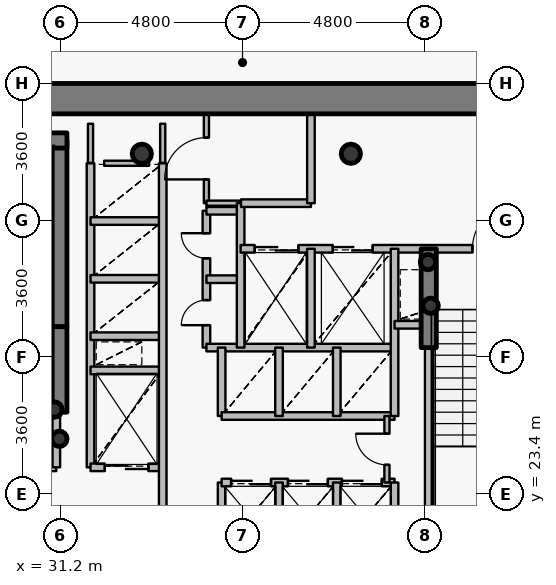
"""IFC4 building model, lengths in metres.
Left out: names, types, materials, properties, quantities, classifications, styles, units other than length and angle.
Written with IfcOpenShell. Run it as: python <this file> out.ifc"""

import sys

from ifc_helpers import new_model, si_unit, direction, frame, frame_2d, origin, origin_2d, place, context, subcontext, project, spatial, rectangle, hollow_circle, extrude, source, transform, mapped, element, fill, save


model = new_model("IFC4")
c1 = context("Model", 3, precision=1e-05, world=origin(), true_north=direction((0.0, 1.0)))
c2 = subcontext(c1, "Body", "Model", "MODEL_VIEW")
j1 = project(units=[si_unit("LENGTHUNIT", "METRE"), si_unit("PLANEANGLEUNIT", "RADIAN")], contexts=[c1])
p1 = place(None, origin())
s1 = spatial("IfcSite", under=j1, at=p1, CompositionType="ELEMENT")
p2 = place(p1, origin())
s2 = spatial("IfcBuilding", under=s1, at=p2, CompositionType="ELEMENT")
p3 = place(p2, frame((0.0, 0.0, 127.2)))
s3 = spatial("IfcBuildingStorey", under=s2, at=p3, CompositionType="ELEMENT", Elevation=127.2)
for number, where, z_axis, x_axis in (
    (1, (38.85, 32.35, 0.0), (0.0, 0.0, 1.0), (1.0, 0.0, 0.0)),
    (2, (33.35, 32.35, 0.0), (0.0, 0.0, 1.0), (1.0, 0.0, 0.0)),
):
    element("IfcColumn", number, at=place(p3, frame(where, z_axis=z_axis, x_axis=x_axis)), inside=s3, PredefinedType="COLUMN", context=c2, shape_type="SweptSolid", body=[
        extrude(hollow_circle(Radius=0.254, WallThickness=0.02, at=origin_2d()), origin(), (0.0, 0.0, 1.0), 3.75),
    ])
p4 = place(p3, frame((31.18, 27.8, 0.0), z_axis=(0.0, 0.0, 1.0), x_axis=(0.0, 1.0, 0.0)))
e3 = element("IfcWall", 3, at=p4, inside=s3, PredefinedType="SHEAR", context=c2, shape_type="SweptSolid", body=[
    extrude(rectangle(XDim=4.9, YDim=0.4, at=frame_2d((2.45, 0.0))), origin(), (0.0, 0.0, 1.0), 3.75),
])
p5 = place(p3, frame((27.28, 32.7, 0.0), z_axis=(0.0, 0.0, 1.0), x_axis=(1.0, 0.0, 0.0)))
e4 = element("IfcWall", 4, at=p5, inside=s3, PredefinedType="SHEAR", context=c2, shape_type="SweptSolid", body=[
    extrude(rectangle(XDim=4.1, YDim=0.4, at=frame_2d((2.05, 0.0))), origin(), (0.0, 0.0, 1.0), 3.75),
])
for number, where, z_axis, x_axis in (
    (5, (31.05, 25.62, 0.0), (0.0, 0.0, 1.0), (1.0, 0.0, 0.0)),
    (6, (31.18, 24.85, 0.0), (0.0, 0.0, 1.0), (1.0, 0.0, 0.0)),
    (7, (40.95, 28.35, 0.0), (0.0, 0.0, 1.0), (1.0, 0.0, 0.0)),
    (8, (40.88, 29.5, 0.0), (0.0, 0.0, 1.0), (1.0, 0.0, 0.0)),
):
    element("IfcColumn", number, at=place(p3, frame(where, z_axis=z_axis, x_axis=x_axis)), inside=s3, PredefinedType="COLUMN", context=c2, shape_type="SweptSolid", body=[
        extrude(hollow_circle(Radius=0.203, WallThickness=0.016, at=origin_2d()), origin(), (0.0, 0.0, 1.0), 3.75),
    ])
p6 = place(p3, frame((26.6, 33.8, 0.0), z_axis=(0.0, 0.0, 1.0), x_axis=(1.0, 0.0, 0.0)))
e9 = element("IfcWall", 9, at=p6, inside=s3, PredefinedType="SHEAR", context=c2, shape_type="SweptSolid", body=[
    extrude(rectangle(XDim=18.8, YDim=0.8, at=frame_2d((9.4, 0.0))), origin(), (0.0, 0.0, 1.0), 2.95),
])
p7 = place(p3, frame((31.18, 25.55, 0.0), z_axis=(0.0, 0.0, 1.0), x_axis=(0.0, 1.0, 0.0)))
e10 = element("IfcWall", 10, at=p7, inside=s3, PredefinedType="SHEAR", context=c2, shape_type="SweptSolid", body=[
    extrude(rectangle(XDim=2.25, YDim=0.4, at=frame_2d((1.125, 0.0))), origin(), (0.0, 0.0, 1.0), 3.1),
])
p8 = place(p3, frame((40.9, 27.25, 0.0), z_axis=(0.0, 0.0, 1.0), x_axis=(0.0, 1.0, 0.0)))
e11 = element("IfcWall", 11, at=p8, inside=s3, PredefinedType="SHEAR", context=c2, shape_type="SweptSolid", body=[
    extrude(rectangle(XDim=2.6, YDim=0.4, at=frame_2d((1.3, 0.0))), origin(), (0.0, 0.0, 1.0), 3.1),
])
p9 = place(p3, frame((27.56, 24.1, 0.0), z_axis=(0.0, 0.0, 1.0), x_axis=(1.0, 0.0, 0.0)))
e12 = element("IfcWall", 12, at=p9, inside=s3, PredefinedType="PARTITIONING", context=c2, shape_type="SweptSolid", body=[
    extrude(rectangle(XDim=3.54, YDim=0.2, at=frame_2d((1.77, 0.0))), origin(), (0.0, 0.0, 1.0), 3.5),
])
p10 = place(p9, frame((1.17, 0.0, 0.0)))
e13 = element("IfcOpeningElement", 13, at=p10, cuts=e12, PredefinedType="OPENING", context=c2, shape_type="SweptSolid", body=[
    extrude(rectangle(XDim=1.2, YDim=2.15, at=origin_2d()), frame((0.6, 0.11, 1.075), z_axis=(0.0, -1.0, 0.0), x_axis=(1.0, 0.0, 0.0)), (0.0, 0.0, 1.0), 0.22),
])
p11 = place(p3, frame((31.1, 24.1, 0.0), z_axis=(0.0, 0.0, 1.0), x_axis=(0.0, 1.0, 0.0)))
e14 = element("IfcWall", 14, at=p11, inside=s3, PredefinedType="PARTITIONING", context=c2, shape_type="SweptSolid", body=[
    extrude(rectangle(XDim=1.44, YDim=0.2, at=frame_2d((0.72, 0.0))), origin(), (0.0, 0.0, 1.0), 3.5),
])
p12 = place(p3, frame((32.0, 24.1, 0.0), z_axis=(0.0, 0.0, 1.0), x_axis=(0.0, 1.0, 0.0)))
e15 = element("IfcWall", 15, at=p12, inside=s3, PredefinedType="PARTITIONING", context=c2, shape_type="SweptSolid", body=[
    extrude(rectangle(XDim=8.0, YDim=0.2, at=frame_2d((4.0, 0.0))), origin(), (0.0, 0.0, 1.0), 3.5),
])
p13 = place(p3, frame((32.0, 24.1, 0.0), z_axis=(0.0, 0.0, 1.0), x_axis=(1.0, 0.0, 0.0)))
e16 = element("IfcWall", 16, at=p13, inside=s3, PredefinedType="PARTITIONING", context=c2, shape_type="SweptSolid", body=[
    extrude(rectangle(XDim=1.9, YDim=0.2, at=frame_2d((0.95, 0.0))), origin(), (0.0, 0.0, 1.0), 3.085),
])
p14 = place(p13, frame((0.375, 0.0, 0.0)))
e17 = element("IfcOpeningElement", 17, at=p14, cuts=e16, PredefinedType="OPENING", context=c2, shape_type="SweptSolid", body=[
    extrude(rectangle(XDim=1.15, YDim=2.15, at=origin_2d()), frame((0.575, 0.11, 1.075), z_axis=(0.0, -1.0, 0.0), x_axis=(1.0, 0.0, 0.0)), (0.0, 0.0, 1.0), 0.22),
])
for number, where, z_axis, x_axis in (
    (18, (32.0, 26.65, 0.0), (0.0, 0.0, 1.0), (1.0, 0.0, 0.0)),
    (19, (32.0, 27.55, 0.0), (0.0, 0.0, 1.0), (1.0, 0.0, 0.0)),
    (20, (32.0, 29.06, 0.0), (0.0, 0.0, 1.0), (1.0, 0.0, 0.0)),
    (21, (32.0, 30.58, 0.0), (0.0, 0.0, 1.0), (1.0, 0.0, 0.0)),
):
    element("IfcWall", number, at=place(p3, frame(where, z_axis=z_axis, x_axis=x_axis)), inside=s3, PredefinedType="PARTITIONING", context=c2, shape_type="SweptSolid", body=[
        extrude(rectangle(XDim=1.9, YDim=0.2, at=frame_2d((0.95, 0.0))), origin(), (0.0, 0.0, 1.0), 3.085),
    ])
p15 = place(p3, frame((33.9, 20.6, 0.0), z_axis=(0.0, 0.0, 1.0), x_axis=(0.0, 1.0, 0.0)))
e22 = element("IfcWall", 22, at=p15, inside=s3, PredefinedType="PARTITIONING", context=c2, shape_type="SweptSolid", body=[
    extrude(rectangle(XDim=11.5, YDim=0.2, at=frame_2d((5.75, 0.0))), origin(), (0.0, 0.0, 1.0), 3.085),
])
p16 = place(p3, frame((35.05, 27.25, 0.0), z_axis=(0.0, 0.0, 1.0), x_axis=(0.0, 1.0, 0.0)))
e23 = element("IfcWall", 23, at=p16, inside=s3, PredefinedType="PARTITIONING", context=c2, shape_type="SweptSolid", body=[
    extrude(rectangle(XDim=3.6, YDim=0.2, at=frame_2d((1.8, 0.0))), origin(), (0.0, 0.0, 1.0), 3.5),
])
p17 = place(p16, frame((0.59, 0.0, 0.0)))
e24 = element("IfcOpeningElement", 24, at=p17, cuts=e23, PredefinedType="OPENING", context=c2, shape_type="SweptSolid", body=[
    extrude(rectangle(XDim=0.66, YDim=2.05, at=origin_2d()), frame((0.33, 0.11, 1.025), z_axis=(0.0, -1.0, 0.0), x_axis=(1.0, 0.0, 0.0)), (0.0, 0.0, 1.0), 0.22),
])
p18 = place(p16, frame((2.35, 0.0, 0.0)))
e25 = element("IfcOpeningElement", 25, at=p18, cuts=e23, PredefinedType="OPENING", context=c2, shape_type="SweptSolid", body=[
    extrude(rectangle(XDim=0.66, YDim=2.05, at=origin_2d()), frame((0.33, 0.11, 1.025), z_axis=(0.0, -1.0, 0.0), x_axis=(1.0, 0.0, 0.0)), (0.0, 0.0, 1.0), 0.22),
])
p19 = place(p3, frame((35.05, 27.25, 0.0), z_axis=(0.0, 0.0, 1.0), x_axis=(1.0, 0.0, 0.0)))
e26 = element("IfcWall", 26, at=p19, inside=s3, PredefinedType="PARTITIONING", context=c2, shape_type="SweptSolid", body=[
    extrude(rectangle(XDim=4.95, YDim=0.2, at=frame_2d((2.475, 0.0))), origin(), (0.0, 0.0, 1.0), 3.085),
])
for number, where, z_axis, x_axis in (
    (27, (35.05, 29.05, 0.0), (0.0, 0.0, 1.0), (1.0, 0.0, 0.0)),
    (28, (35.05, 30.85, 0.0), (0.0, 0.0, 1.0), (1.0, 0.0, 0.0)),
):
    element("IfcWall", number, at=place(p3, frame(where, z_axis=z_axis, x_axis=x_axis)), inside=s3, PredefinedType="PARTITIONING", context=c2, shape_type="SweptSolid", body=[
        extrude(rectangle(XDim=0.9, YDim=0.2, at=frame_2d((0.45, 0.0))), origin(), (0.0, 0.0, 1.0), 3.5),
    ])
p20 = place(p3, frame((35.05, 31.05, 0.0), z_axis=(0.0, 0.0, 1.0), x_axis=(0.0, 1.0, 0.0)))
e29 = element("IfcWall", 29, at=p20, inside=s3, PredefinedType="PARTITIONING", context=c2, shape_type="SweptSolid", body=[
    extrude(rectangle(XDim=2.35, YDim=0.135, at=frame_2d((1.175, 0.0))), origin(), (0.0, 0.0, 1.0), 3.085),
])
p21 = place(p20, frame((0.625, 0.0, 0.0)))
e30 = element("IfcOpeningElement", 30, at=p21, cuts=e29, PredefinedType="OPENING", context=c2, shape_type="SweptSolid", body=[
    extrude(rectangle(XDim=1.1, YDim=2.15, at=origin_2d()), frame((0.55, 0.078, 1.075), z_axis=(0.0, -1.0, 0.0), x_axis=(1.0, 0.0, 0.0)), (0.0, 0.0, 1.0), 0.155),
])
p22 = place(p3, frame((35.05, 31.05, 0.0), z_axis=(0.0, 0.0, 1.0), x_axis=(1.0, 0.0, 0.0)))
e31 = element("IfcWall", 31, at=p22, inside=s3, PredefinedType="PARTITIONING", context=c2, shape_type="SweptSolid", body=[
    extrude(rectangle(XDim=0.9, YDim=0.135, at=frame_2d((0.45, 0.0))), origin(), (0.0, 0.0, 1.0), 3.5),
])
p23 = place(p3, frame((35.45, 21.9, 0.0), z_axis=(0.0, 0.0, 1.0), x_axis=(0.0, 1.0, 0.0)))
e32 = element("IfcWall", 32, at=p23, inside=s3, PredefinedType="PARTITIONING", context=c2, shape_type="SweptSolid", body=[
    extrude(rectangle(XDim=1.8, YDim=0.2, at=frame_2d((0.9, 0.0))), origin(), (0.0, 0.0, 1.0), 3.5),
])
p24 = place(p3, frame((35.45, 23.7, 0.0), z_axis=(0.0, 0.0, 1.0), x_axis=(1.0, 0.0, 0.0)))
e33 = element("IfcWall", 33, at=p24, inside=s3, PredefinedType="PARTITIONING", context=c2, shape_type="SweptSolid", body=[
    extrude(rectangle(XDim=4.55, YDim=0.2, at=frame_2d((2.275, 0.0))), origin(), (0.0, 0.0, 1.0), 3.085),
])
p25 = place(p24, frame((0.25, 0.0, 0.0)))
e34 = element("IfcOpeningElement", 34, at=p25, cuts=e33, PredefinedType="OPENING", context=c2, shape_type="SweptSolid", body=[
    extrude(rectangle(XDim=1.05, YDim=2.15, at=origin_2d()), frame((0.525, 0.11, 1.075), z_axis=(0.0, -1.0, 0.0), x_axis=(1.0, 0.0, 0.0)), (0.0, 0.0, 1.0), 0.22),
])
p26 = place(p24, frame((1.745, 0.0, 0.0)))
e35 = element("IfcOpeningElement", 35, at=p26, cuts=e33, PredefinedType="OPENING", context=c2, shape_type="SweptSolid", body=[
    extrude(rectangle(XDim=1.05, YDim=2.15, at=origin_2d()), frame((0.525, 0.11, 1.075), z_axis=(0.0, -1.0, 0.0), x_axis=(1.0, 0.0, 0.0)), (0.0, 0.0, 1.0), 0.22),
])
p27 = place(p24, frame((3.165, 0.0, 0.0)))
e36 = element("IfcOpeningElement", 36, at=p27, cuts=e33, PredefinedType="OPENING", context=c2, shape_type="SweptSolid", body=[
    extrude(rectangle(XDim=1.05, YDim=2.15, at=origin_2d()), frame((0.525, 0.11, 1.075), z_axis=(0.0, -1.0, 0.0), x_axis=(1.0, 0.0, 0.0)), (0.0, 0.0, 1.0), 0.22),
])
p28 = place(p3, frame((35.45, 25.45, 0.0), z_axis=(0.0, 0.0, 1.0), x_axis=(0.0, 1.0, 0.0)))
e37 = element("IfcWall", 37, at=p28, inside=s3, PredefinedType="PARTITIONING", context=c2, shape_type="SweptSolid", body=[
    extrude(rectangle(XDim=1.8, YDim=0.2, at=frame_2d((0.9, 0.0))), origin(), (0.0, 0.0, 1.0), 3.5),
])
p29 = place(p3, frame((35.45, 25.45, 0.0), z_axis=(0.0, 0.0, 1.0), x_axis=(1.0, 0.0, 0.0)))
e38 = element("IfcWall", 38, at=p29, inside=s3, PredefinedType="PARTITIONING", context=c2, shape_type="SweptSolid", body=[
    extrude(rectangle(XDim=4.55, YDim=0.2, at=frame_2d((2.275, 0.0))), origin(), (0.0, 0.0, 1.0), 3.085),
])
p30 = place(p3, frame((35.95, 27.25, 0.0), z_axis=(0.0, 0.0, 1.0), x_axis=(0.0, 1.0, 0.0)))
e39 = element("IfcWall", 39, at=p30, inside=s3, PredefinedType="PARTITIONING", context=c2, shape_type="SweptSolid", body=[
    extrude(rectangle(XDim=3.8, YDim=0.2, at=frame_2d((1.9, 0.0))), origin(), (0.0, 0.0, 1.0), 3.5),
])
p31 = place(p3, frame((35.95, 29.85, 0.0), z_axis=(0.0, 0.0, 1.0), x_axis=(1.0, 0.0, 0.0)))
e40 = element("IfcWall", 40, at=p31, inside=s3, PredefinedType="PARTITIONING", context=c2, shape_type="SweptSolid", body=[
    extrude(rectangle(XDim=8.49, YDim=0.2, at=frame_2d((4.245, 0.0))), origin(), (0.0, 0.0, 1.0), 3.085),
])
p32 = place(p31, frame((6.1, 0.0, 0.0)))
e41 = element("IfcOpeningElement", 41, at=p32, cuts=e40, PredefinedType="OPENING", context=c2, shape_type="SweptSolid", body=[
    extrude(rectangle(XDim=1.2, YDim=2.15, at=origin_2d()), frame((0.6, 0.11, 1.075), z_axis=(0.0, -1.0, 0.0), x_axis=(1.0, 0.0, 0.0)), (0.0, 0.0, 1.0), 0.22),
])
p33 = place(p31, frame((0.37, 0.0, 0.0)))
e42 = element("IfcOpeningElement", 42, at=p33, cuts=e40, PredefinedType="OPENING", context=c2, shape_type="SweptSolid", body=[
    extrude(rectangle(XDim=1.15, YDim=2.15, at=origin_2d()), frame((0.575, 0.11, 1.075), z_axis=(0.0, -1.0, 0.0), x_axis=(1.0, 0.0, 0.0)), (0.0, 0.0, 1.0), 0.22),
])
p34 = place(p31, frame((2.425, 0.0, 0.0)))
e43 = element("IfcOpeningElement", 43, at=p34, cuts=e40, PredefinedType="OPENING", context=c2, shape_type="SweptSolid", body=[
    extrude(rectangle(XDim=1.05, YDim=2.15, at=origin_2d()), frame((0.525, 0.11, 1.075), z_axis=(0.0, -1.0, 0.0), x_axis=(1.0, 0.0, 0.0)), (0.0, 0.0, 1.0), 0.22),
])
p35 = place(p3, frame((35.96, 31.05, 0.0), z_axis=(0.0, 0.0, 1.0), x_axis=(1.0, 0.0, 0.0)))
e44 = element("IfcWall", 44, at=p35, inside=s3, PredefinedType="PARTITIONING", context=c2, shape_type="SweptSolid", body=[
    extrude(rectangle(XDim=1.84, YDim=0.2, at=frame_2d((0.92, 0.0))), origin(), (0.0, 0.0, 1.0), 3.5),
])
for number, where, z_axis, x_axis in (
    (45, (36.96, 21.9, 0.0), (0.0, 0.0, 1.0), (0.0, 1.0, 0.0)),
    (46, (36.96, 25.45, 0.0), (0.0, 0.0, 1.0), (0.0, 1.0, 0.0)),
):
    element("IfcWall", number, at=place(p3, frame(where, z_axis=z_axis, x_axis=x_axis)), inside=s3, PredefinedType="PARTITIONING", context=c2, shape_type="SweptSolid", body=[
        extrude(rectangle(XDim=1.8, YDim=0.2, at=frame_2d((0.9, 0.0))), origin(), (0.0, 0.0, 1.0), 3.5),
    ])
p36 = place(p3, frame((37.8, 27.25, 0.0), z_axis=(0.0, 0.0, 1.0), x_axis=(0.0, 1.0, 0.0)))
e47 = element("IfcWall", 47, at=p36, inside=s3, PredefinedType="PARTITIONING", context=c2, shape_type="SweptSolid", body=[
    extrude(rectangle(XDim=2.6, YDim=0.2, at=frame_2d((1.3, 0.0))), origin(), (0.0, 0.0, 1.0), 3.5),
])
p37 = place(p3, frame((37.8, 31.05, 0.0), z_axis=(0.0, 0.0, 1.0), x_axis=(0.0, 1.0, 0.0)))
e48 = element("IfcWall", 48, at=p37, inside=s3, PredefinedType="PARTITIONING", context=c2, shape_type="SweptSolid", body=[
    extrude(rectangle(XDim=2.35, YDim=0.2, at=frame_2d((1.175, 0.0))), origin(), (0.0, 0.0, 1.0), 3.085),
])
for number, where, z_axis, x_axis in (
    (49, (38.48, 21.9, 0.0), (0.0, 0.0, 1.0), (0.0, 1.0, 0.0)),
    (50, (38.48, 25.45, 0.0), (0.0, 0.0, 1.0), (0.0, 1.0, 0.0)),
):
    element("IfcWall", number, at=place(p3, frame(where, z_axis=z_axis, x_axis=x_axis)), inside=s3, PredefinedType="PARTITIONING", context=c2, shape_type="SweptSolid", body=[
        extrude(rectangle(XDim=1.8, YDim=0.2, at=frame_2d((0.9, 0.0))), origin(), (0.0, 0.0, 1.0), 3.5),
    ])
p38 = place(p3, frame((39.8, 23.7, 0.0), z_axis=(0.0, 0.0, 1.0), x_axis=(0.0, 1.0, 0.0)))
e51 = element("IfcWall", 51, at=p38, inside=s3, PredefinedType="PARTITIONING", context=c2, shape_type="SweptSolid", body=[
    extrude(rectangle(XDim=1.75, YDim=0.135, at=frame_2d((0.875, 0.0))), origin(), (0.0, 0.0, 1.0), 3.5),
])
p39 = place(p38, frame((0.465, 0.0, 0.0)))
e52 = element("IfcOpeningElement", 52, at=p39, cuts=e51, PredefinedType="OPENING", context=c2, shape_type="SweptSolid", body=[
    extrude(rectangle(XDim=0.82, YDim=2.1, at=origin_2d()), frame((0.41, 0.078, 1.05), z_axis=(0.0, -1.0, 0.0), x_axis=(1.0, 0.0, 0.0)), (0.0, 0.0, 1.0), 0.155),
])
p40 = place(p3, frame((40.0, 21.9, 0.0), z_axis=(0.0, 0.0, 1.0), x_axis=(0.0, 1.0, 0.0)))
e53 = element("IfcWall", 53, at=p40, inside=s3, PredefinedType="PARTITIONING", context=c2, shape_type="SweptSolid", body=[
    extrude(rectangle(XDim=1.8, YDim=0.2, at=frame_2d((0.9, 0.0))), origin(), (0.0, 0.0, 1.0), 3.5),
])
p41 = place(p3, frame((40.0, 25.45, 0.0), z_axis=(0.0, 0.0, 1.0), x_axis=(0.0, 1.0, 0.0)))
e54 = element("IfcWall", 54, at=p41, inside=s3, PredefinedType="PARTITIONING", context=c2, shape_type="SweptSolid", body=[
    extrude(rectangle(XDim=4.4, YDim=0.2, at=frame_2d((2.2, 0.0))), origin(), (0.0, 0.0, 1.0), 3.5),
])
p42 = place(p3, frame((40.0, 27.85, 0.0), z_axis=(0.0, 0.0, 1.0), x_axis=(1.0, 0.0, 0.0)))
e55 = element("IfcWall", 55, at=p42, inside=s3, PredefinedType="PARTITIONING", context=c2, shape_type="SweptSolid", body=[
    extrude(rectangle(XDim=0.9, YDim=0.2, at=frame_2d((0.45, 0.0))), origin(), (0.0, 0.0, 1.0), 3.5),
])
p43 = place(p3, frame((40.9, 21.33, 0.0), z_axis=(0.0, 0.0, 1.0), x_axis=(0.0, 1.0, 0.0)))
e56 = element("IfcWall", 56, at=p43, inside=s3, PredefinedType="PARTITIONING", context=c2, shape_type="SweptSolid", body=[
    extrude(rectangle(XDim=5.91, YDim=0.2, at=frame_2d((2.955, 0.0))), origin(), (0.0, 0.0, 1.0), 3.035),
])
p44 = place(p3, frame((32.36, 32.1, 0.0), z_axis=(0.0, 0.0, 1.0), x_axis=(1.0, 0.0, 0.0)))
e57 = element("IfcWall", 57, at=p44, inside=s3, PredefinedType="PARTITIONING", context=c2, shape_type="SweptSolid", body=[
    extrude(rectangle(XDim=1.18, YDim=0.135, at=frame_2d((0.59, 0.0))), origin(), (0.0, 0.0, 1.0), 3.085),
])
p45 = place(p3, frame((32.0, 33.14, 0.0), z_axis=(0.0, 0.0, 1.0), x_axis=(0.0, -1.0, 0.0)))
e58 = element("IfcWall", 58, at=p45, inside=s3, PredefinedType="PARTITIONING", context=c2, shape_type="SweptSolid", body=[
    extrude(rectangle(XDim=1.03, YDim=0.135, at=frame_2d((0.515, 0.0))), origin(), (0.0, 0.0, 1.0), 3.035),
])
p46 = place(p3, frame((33.9, 32.11, 0.0), z_axis=(0.0, 0.0, 1.0), x_axis=(0.0, 1.0, 0.0)))
e59 = element("IfcWall", 59, at=p46, inside=s3, PredefinedType="PARTITIONING", context=c2, shape_type="SweptSolid", body=[
    extrude(rectangle(XDim=1.03, YDim=0.135, at=frame_2d((0.515, 0.0))), origin(), (0.0, 0.0, 1.0), 3.085),
])
m1 = source(origin(), c2, "Body", "SweptSolid", [
    extrude(rectangle(XDim=1.2, YDim=2.15, at=origin_2d()), frame((0.6, 0.025, 1.075), z_axis=(0.0, -1.0, 0.0), x_axis=(1.0, 0.0, 0.0)), (0.0, 0.0, 1.0), 0.05),
])
p47 = place(p32, origin())
e60 = element("IfcDoor", 60, at=p47, inside=s3, OperationType="SINGLE_SWING_RIGHT", PredefinedType="DOOR", context=c2, shape_type="MappedRepresentation", body=[
    mapped(m1, transform((0.0, 0.0, 0.0), x_axis=(1.0, 0.0, 0.0), y_axis=(0.0, 1.0, 0.0), z_axis=(0.0, 0.0, 1.0), scale=1.0)),
])
fill(e41, e60)
m2 = source(origin(), c2, "Body", "SweptSolid", [
    extrude(rectangle(XDim=1.15, YDim=2.15, at=origin_2d()), frame((0.575, 0.025, 1.075), z_axis=(0.0, -1.0, 0.0), x_axis=(1.0, 0.0, 0.0)), (0.0, 0.0, 1.0), 0.05),
])
p48 = place(p33, origin())
e61 = element("IfcDoor", 61, at=p48, inside=s3, OperationType="DOUBLE_DOOR_SLIDING", PredefinedType="USERDEFINED", context=c2, shape_type="MappedRepresentation", body=[
    mapped(m2, transform((0.0, 0.0, 0.0), x_axis=(1.0, 0.0, 0.0), y_axis=(0.0, 1.0, 0.0), z_axis=(0.0, 0.0, 1.0), scale=1.0)),
])
fill(e42, e61)
p49 = place(p14, origin())
e62 = element("IfcDoor", 62, at=p49, inside=s3, OperationType="DOUBLE_DOOR_SLIDING", PredefinedType="USERDEFINED", context=c2, shape_type="MappedRepresentation", body=[
    mapped(m2, transform((0.0, 0.0, 0.0), x_axis=(1.0, 0.0, 0.0), y_axis=(0.0, 1.0, 0.0), z_axis=(0.0, 0.0, 1.0), scale=1.0)),
])
fill(e17, e62)
m3 = source(origin(), c2, "Body", "SweptSolid", [
    extrude(rectangle(XDim=1.05, YDim=2.15, at=origin_2d()), frame((0.525, 0.025, 1.075), z_axis=(0.0, -1.0, 0.0), x_axis=(1.0, 0.0, 0.0)), (0.0, 0.0, 1.0), 0.05),
])
p50 = place(p34, origin())
e63 = element("IfcDoor", 63, at=p50, inside=s3, OperationType="DOUBLE_DOOR_SLIDING", PredefinedType="USERDEFINED", context=c2, shape_type="MappedRepresentation", body=[
    mapped(m3, transform((0.0, 0.0, 0.0), x_axis=(1.0, 0.0, 0.0), y_axis=(0.0, 1.0, 0.0), z_axis=(0.0, 0.0, 1.0), scale=1.0)),
])
fill(e43, e63)
p51 = place(p25, origin())
e64 = element("IfcDoor", 64, at=p51, inside=s3, OperationType="DOUBLE_DOOR_SLIDING", PredefinedType="USERDEFINED", context=c2, shape_type="MappedRepresentation", body=[
    mapped(m3, transform((0.0, 0.0, 0.0), x_axis=(1.0, 0.0, 0.0), y_axis=(0.0, 1.0, 0.0), z_axis=(0.0, 0.0, 1.0), scale=1.0)),
])
fill(e34, e64)
p52 = place(p26, origin())
e65 = element("IfcDoor", 65, at=p52, inside=s3, OperationType="DOUBLE_DOOR_SLIDING", PredefinedType="USERDEFINED", context=c2, shape_type="MappedRepresentation", body=[
    mapped(m3, transform((0.0, 0.0, 0.0), x_axis=(1.0, 0.0, 0.0), y_axis=(0.0, 1.0, 0.0), z_axis=(0.0, 0.0, 1.0), scale=1.0)),
])
fill(e35, e65)
p53 = place(p27, origin())
e66 = element("IfcDoor", 66, at=p53, inside=s3, OperationType="DOUBLE_DOOR_SLIDING", PredefinedType="USERDEFINED", context=c2, shape_type="MappedRepresentation", body=[
    mapped(m3, transform((0.0, 0.0, 0.0), x_axis=(1.0, 0.0, 0.0), y_axis=(0.0, 1.0, 0.0), z_axis=(0.0, 0.0, 1.0), scale=1.0)),
])
fill(e36, e66)
m4 = source(origin(), c2, "Body", "SweptSolid", [
    extrude(rectangle(XDim=0.66, YDim=2.05, at=origin_2d()), frame((0.33, 0.025, 1.025), z_axis=(0.0, -1.0, 0.0), x_axis=(1.0, 0.0, 0.0)), (0.0, 0.0, 1.0), 0.05),
])
p54 = place(p17, origin())
e67 = element("IfcDoor", 67, at=p54, inside=s3, OperationType="SINGLE_SWING_LEFT", PredefinedType="USERDEFINED", context=c2, shape_type="MappedRepresentation", body=[
    mapped(m4, transform((0.0, 0.0, 0.0), x_axis=(1.0, 0.0, 0.0), y_axis=(0.0, 1.0, 0.0), z_axis=(0.0, 0.0, 1.0), scale=1.0)),
])
fill(e24, e67)
p55 = place(p18, origin())
e68 = element("IfcDoor", 68, at=p55, inside=s3, OperationType="SINGLE_SWING_RIGHT", PredefinedType="USERDEFINED", context=c2, shape_type="MappedRepresentation", body=[
    mapped(m4, transform((0.0, 0.0, 0.0), x_axis=(1.0, 0.0, 0.0), y_axis=(0.0, 1.0, 0.0), z_axis=(0.0, 0.0, 1.0), scale=1.0)),
])
fill(e25, e68)
m5 = source(origin(), c2, "Body", "SweptSolid", [
    extrude(rectangle(XDim=1.1, YDim=2.15, at=origin_2d()), frame((0.55, 0.025, 1.075), z_axis=(0.0, -1.0, 0.0), x_axis=(1.0, 0.0, 0.0)), (0.0, 0.0, 1.0), 0.05),
])
p56 = place(p21, origin())
e69 = element("IfcDoor", 69, at=p56, inside=s3, OperationType="SINGLE_SWING_LEFT", PredefinedType="DOOR", context=c2, shape_type="MappedRepresentation", body=[
    mapped(m5, transform((0.0, 0.0, 0.0), x_axis=(1.0, 0.0, 0.0), y_axis=(0.0, 1.0, 0.0), z_axis=(0.0, 0.0, 1.0), scale=1.0)),
])
fill(e30, e69)
m6 = source(origin(), c2, "Body", "SweptSolid", [
    extrude(rectangle(XDim=0.82, YDim=2.1, at=origin_2d()), frame((0.41, 0.025, 1.05), z_axis=(0.0, -1.0, 0.0), x_axis=(1.0, 0.0, 0.0)), (0.0, 0.0, 1.0), 0.05),
])
p57 = place(p39, origin())
e70 = element("IfcDoor", 70, at=p57, inside=s3, OperationType="SINGLE_SWING_RIGHT", PredefinedType="DOOR", context=c2, shape_type="MappedRepresentation", body=[
    mapped(m6, transform((0.0, 0.0, 0.0), x_axis=(1.0, 0.0, 0.0), y_axis=(0.0, 1.0, 0.0), z_axis=(0.0, 0.0, 1.0), scale=1.0)),
])
fill(e52, e70)
save(model, sys.argv[1])
